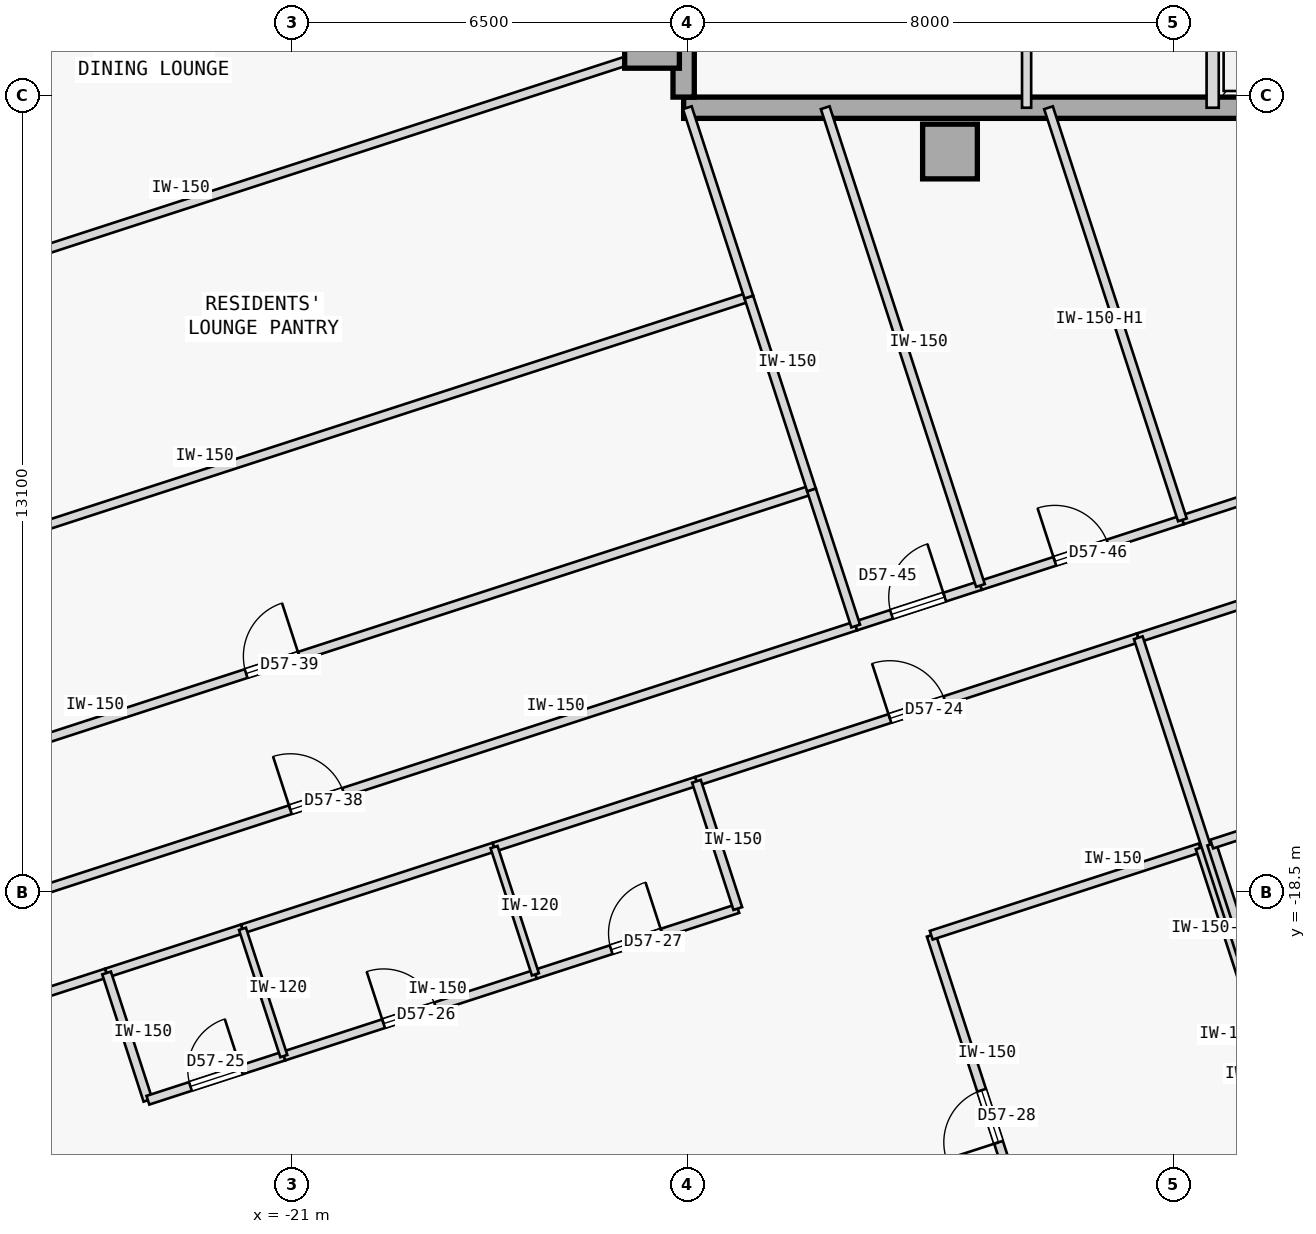
"""IFC4 building model, lengths in metres.
Left out: names, types, materials, properties, quantities, classifications, styles, units other than length and angle.
Written with IfcOpenShell. Run it as: python <this file> out.ifc"""

import sys

from ifc_helpers import new_model, si_unit, direction, frame, frame_2d, origin, origin_2d, place, context, subcontext, project, spatial, rectangle, extrude, element, fill, save


model = new_model("IFC4")
c1 = context("Model", 3, precision=1e-05, world=origin(), true_north=direction((0.0, 1.0)))
c2 = subcontext(c1, "Body", "Model", "MODEL_VIEW")
j1 = project(units=[si_unit("LENGTHUNIT", "METRE"), si_unit("PLANEANGLEUNIT", "RADIAN")], contexts=[c1])
p1 = place(None, origin())
s1 = spatial("IfcSite", under=j1, at=p1, CompositionType="ELEMENT")
p2 = place(p1, origin())
s2 = spatial("IfcBuilding", under=s1, at=p2, CompositionType="ELEMENT")
p3 = place(p2, frame((0.0, 0.0, 217.6)))
s3 = spatial("IfcBuildingStorey", under=s2, at=p3, CompositionType="ELEMENT", Elevation=217.6)
for number, where, z_axis, x_axis in (
    (1, (-15.08, -4.5, 0.0), (0.0, 0.0, 1.0), (1.0, 0.0, 0.0)),
    (2, (-10.18, -6.32, 0.0), (0.0, 0.0, 1.0), (1.0, 0.0, 0.0)),
):
    element("IfcColumn", number, at=place(p3, frame(where, z_axis=z_axis, x_axis=x_axis)), inside=s3, PredefinedType="COLUMN", context=c2, shape_type="SweptSolid", body=[
        extrude(rectangle(XDim=0.9, YDim=0.9, at=origin_2d()), origin(), (0.0, 0.0, 1.0), 3.35),
    ])
p4 = place(p3, frame((-14.56, -5.6, 0.0), z_axis=(0.0, 0.0, 1.0), x_axis=(1.0, 0.0, 0.0)))
e3 = element("IfcWall", 3, at=p4, inside=s3, PredefinedType="SHEAR", context=c2, shape_type="SweptSolid", body=[
    extrude(rectangle(XDim=10.86, YDim=0.35, at=frame_2d((5.43, 0.0))), origin(), (0.0, 0.0, 1.0), 3.125),
])
p5 = place(p3, frame((-14.56, -5.425, 0.0), z_axis=(0.0, 0.0, 1.0), x_axis=(0.0, 1.0, 0.0)))
e4 = element("IfcWall", 4, at=p5, inside=s3, PredefinedType="SHEAR", context=c2, shape_type="SweptSolid", body=[
    extrude(rectangle(XDim=10.85, YDim=0.35, at=frame_2d((5.425, 0.0))), origin(), (0.0, 0.0, 1.0), 3.125),
])
p6 = place(p3, frame((-5.86, -5.6, 0.0), z_axis=(0.0, 0.0, 1.0), x_axis=(0.0, 1.0, 0.0)))
e5 = element("IfcWall", 5, at=p6, inside=s3, PredefinedType="STANDARD", context=c2, shape_type="SweptSolid", body=[
    extrude(rectangle(XDim=2.65, YDim=0.2, at=frame_2d((1.325, 0.0))), origin(), (0.0, 0.0, 1.0), 3.125),
])
p7 = place(p3, frame((-8.92, -5.6, 0.0), z_axis=(0.0, 0.0, 1.0), x_axis=(0.0, 1.0, 0.0)))
e6 = element("IfcWall", 6, at=p7, inside=s3, PredefinedType="PARTITIONING", context=c2, shape_type="SweptSolid", body=[
    extrude(rectangle(XDim=2.65, YDim=0.15, at=frame_2d((1.325, 0.0))), origin(), (0.0, 0.0, 1.0), 3.125),
])
p8 = place(p3, frame((-28.95, -21.421, 0.0), z_axis=(0.0, 0.0, 1.0), x_axis=(0.951058442388, 0.309011066408, 0.0)))
e7 = element("IfcWall", 7, at=p8, inside=s3, PredefinedType="PARTITIONING", context=c2, shape_type="SweptSolid", body=[
    extrude(rectangle(XDim=5.152, YDim=0.15, at=frame_2d((2.576, 0.0))), origin(), (0.0, 0.0, 1.0), 3.125),
])
p9 = place(p3, frame((-14.349, -16.677, 0.0), z_axis=(0.0, 0.0, 1.0), x_axis=(0.951058958043, 0.309009479345, 0.0)))
e8 = element("IfcWall", 8, at=p9, inside=s3, PredefinedType="PARTITIONING", context=c2, shape_type="SweptSolid", body=[
    extrude(rectangle(XDim=7.64, YDim=0.15, at=frame_2d((3.82, 0.0))), origin(), (0.0, 0.0, 1.0), 3.125),
])
p10 = place(p9, frame((3.345, 0.0, 0.0)))
e9 = element("IfcOpeningElement", 9, at=p10, cuts=e8, PredefinedType="OPENING", context=c2, shape_type="SweptSolid", body=[
    extrude(rectangle(XDim=0.95, YDim=2.15, at=frame_2d((0.475, 1.075))), frame((0.0, 0.085, 0.0), z_axis=(0.0, -1.0, 0.0), x_axis=(1.0, 0.0, 0.0)), (0.0, 0.0, 1.0), 0.17),
])
p11 = place(p3, frame((-24.05, -19.829, 0.0), z_axis=(0.0, 0.0, 1.0), x_axis=(0.951035595692, 0.309081373955, 0.0)))
e10 = element("IfcWall", 10, at=p11, inside=s3, PredefinedType="PARTITIONING", context=c2, shape_type="SweptSolid", body=[
    extrude(rectangle(XDim=2.35, YDim=0.15, at=frame_2d((1.175, 0.0))), origin(), (0.0, 0.0, 1.0), 3.125),
])
p12 = place(p3, frame((-21.815, -19.103, 0.0), z_axis=(0.0, 0.0, 1.0), x_axis=(0.951057987102, 0.309012467661, 0.0)))
e11 = element("IfcWall", 11, at=p12, inside=s3, PredefinedType="PARTITIONING", context=c2, shape_type="SweptSolid", body=[
    extrude(rectangle(XDim=4.35, YDim=0.15, at=frame_2d((2.175, 0.0))), origin(), (0.0, 0.0, 1.0), 3.125),
])
p13 = place(p3, frame((-17.678, -17.759, 0.0), z_axis=(0.0, 0.0, 1.0), x_axis=(0.951055596592, 0.309019824916, 0.0)))
e12 = element("IfcWall", 12, at=p13, inside=s3, PredefinedType="PARTITIONING", context=c2, shape_type="SweptSolid", body=[
    extrude(rectangle(XDim=3.5, YDim=0.15, at=frame_2d((1.75, 0.0))), origin(), (0.0, 0.0, 1.0), 3.125),
])
p14 = place(p3, frame((-7.083, -14.316, 0.0), z_axis=(0.0, 0.0, 1.0), x_axis=(0.951054265246, 0.309023922305, 0.0)))
e13 = element("IfcWall", 13, at=p14, inside=s3, PredefinedType="PARTITIONING", context=c2, shape_type="SweptSolid", body=[
    extrude(rectangle(XDim=4.53, YDim=0.15, at=frame_2d((2.265, 0.0))), origin(), (0.0, 0.0, 1.0), 3.125),
])
p15 = place(p3, frame((-29.45, -19.881, 0.0), z_axis=(0.0, 0.0, 1.0), x_axis=(0.95105650271, 0.309017036186, 0.0)))
e14 = element("IfcWall", 14, at=p15, inside=s3, PredefinedType="PARTITIONING", context=c2, shape_type="SweptSolid", body=[
    extrude(rectangle(XDim=18.632, YDim=0.15, at=frame_2d((9.316, 0.0))), origin(), (0.0, 0.0, 1.0), 3.125),
])
p16 = place(p15, frame((8.856, 0.0, 0.0)))
e15 = element("IfcOpeningElement", 15, at=p16, cuts=e14, PredefinedType="OPENING", context=c2, shape_type="SweptSolid", body=[
    extrude(rectangle(XDim=0.92, YDim=2.15, at=frame_2d((0.46, 1.075))), frame((0.0, 0.085, 0.0), z_axis=(0.0, -1.0, 0.0), x_axis=(1.0, 0.0, 0.0)), (0.0, 0.0, 1.0), 0.17),
])
p17 = place(p3, frame((-11.73, -14.123, 0.0), z_axis=(0.0, 0.0, 1.0), x_axis=(0.951066501686, 0.308986260812, 0.0)))
e16 = element("IfcWall", 16, at=p17, inside=s3, PredefinedType="PARTITIONING", context=c2, shape_type="SweptSolid", body=[
    extrude(rectangle(XDim=2.157, YDim=0.15, at=frame_2d((1.079, 0.0))), origin(), (0.0, 0.0, 1.0), 3.125),
])
p18 = place(p17, frame((0.618, 0.0, 0.0)))
e17 = element("IfcOpeningElement", 17, at=p18, cuts=e16, PredefinedType="OPENING", context=c2, shape_type="SweptSolid", body=[
    extrude(rectangle(XDim=0.92, YDim=2.15, at=frame_2d((0.46, 1.075))), frame((0.0, 0.085, 0.0), z_axis=(0.0, -1.0, 0.0), x_axis=(1.0, 0.0, 0.0)), (0.0, 0.0, 1.0), 0.17),
])
p19 = place(p3, frame((-9.679, -13.457, 0.0), z_axis=(0.0, 0.0, 1.0), x_axis=(0.951054104561, 0.309024416831, 0.0)))
e18 = element("IfcWall", 18, at=p19, inside=s3, PredefinedType="PARTITIONING", context=c2, shape_type="SweptSolid", body=[
    extrude(rectangle(XDim=3.492, YDim=0.15, at=frame_2d((1.746, 0.0))), origin(), (0.0, 0.0, 1.0), 3.125),
])
p20 = place(p19, frame((1.286, 0.0, 0.0)))
e19 = element("IfcOpeningElement", 19, at=p20, cuts=e18, PredefinedType="OPENING", context=c2, shape_type="SweptSolid", body=[
    extrude(rectangle(XDim=0.92, YDim=2.15, at=frame_2d((0.46, 1.075))), frame((0.0, 0.085, 0.0), z_axis=(0.0, -1.0, 0.0), x_axis=(1.0, 0.0, 0.0)), (0.0, 0.0, 1.0), 0.17),
])
p21 = place(p3, frame((-6.358, -12.377, 0.0), z_axis=(0.0, 0.0, 1.0), x_axis=(0.951049473261, 0.309038669765, 0.0)))
e20 = element("IfcWall", 20, at=p21, inside=s3, PredefinedType="PARTITIONING", context=c2, shape_type="SweptSolid", body=[
    extrude(rectangle(XDim=2.795, YDim=0.15, at=frame_2d((1.397, 0.0))), origin(), (0.0, 0.0, 1.0), 3.125),
])
p22 = place(p3, frame((-23.37, -21.922, 0.0), z_axis=(0.0, 0.0, 1.0), x_axis=(-0.308960600764, 0.951074837842, 0.0)))
e21 = element("IfcWall", 21, at=p22, inside=s3, PredefinedType="PARTITIONING", context=c2, shape_type="SweptSolid", body=[
    extrude(rectangle(XDim=2.2, YDim=0.15, at=frame_2d((1.1, 0.0))), origin(), (0.0, 0.0, 1.0), 3.125),
])
p23 = place(p3, frame((-23.37, -21.922, 0.0), z_axis=(0.0, 0.0, 1.0), x_axis=(0.951045519245, 0.309050837767, 0.0)))
e22 = element("IfcWall", 22, at=p23, inside=s3, PredefinedType="PARTITIONING", context=c2, shape_type="SweptSolid", body=[
    extrude(rectangle(XDim=2.35, YDim=0.15, at=frame_2d((1.175, 0.0))), origin(), (0.0, 0.0, 1.0), 3.125),
])
p24 = place(p23, frame((0.735, 0.0, 0.0)))
e23 = element("IfcOpeningElement", 23, at=p24, cuts=e22, PredefinedType="OPENING", context=c2, shape_type="SweptSolid", body=[
    extrude(rectangle(XDim=0.88, YDim=2.15, at=frame_2d((0.44, 1.075))), frame((0.0, 0.085, 0.0), z_axis=(0.0, -1.0, 0.0), x_axis=(1.0, 0.0, 0.0)), (0.0, 0.0, 1.0), 0.17),
])
p25 = place(p3, frame((-21.135, -21.195, 0.0), z_axis=(0.0, 0.0, 1.0), x_axis=(0.951069122051, 0.308978195154, 0.0)))
e24 = element("IfcWall", 24, at=p25, inside=s3, PredefinedType="PARTITIONING", context=c2, shape_type="SweptSolid", body=[
    extrude(rectangle(XDim=4.35, YDim=0.15, at=frame_2d((2.175, 0.0))), origin(), (0.0, 0.0, 1.0), 3.125),
])
p26 = place(p25, frame((1.725, 0.0, 0.0)))
e25 = element("IfcOpeningElement", 25, at=p26, cuts=e24, PredefinedType="OPENING", context=c2, shape_type="SweptSolid", body=[
    extrude(rectangle(XDim=0.9, YDim=2.15, at=frame_2d((0.45, 1.075))), frame((0.0, 0.085, 0.0), z_axis=(0.0, -1.0, 0.0), x_axis=(1.0, 0.0, 0.0)), (0.0, 0.0, 1.0), 0.17),
])
p27 = place(p3, frame((-16.998, -19.851, 0.0), z_axis=(0.0, 0.0, 1.0), x_axis=(0.951041757107, 0.309062414796, 0.0)))
e26 = element("IfcWall", 26, at=p27, inside=s3, PredefinedType="PARTITIONING", context=c2, shape_type="SweptSolid", body=[
    extrude(rectangle(XDim=3.5, YDim=0.15, at=frame_2d((1.75, 0.0))), origin(), (0.0, 0.0, 1.0), 3.125),
])
p28 = place(p27, frame((1.31, 0.0, 0.0)))
e27 = element("IfcOpeningElement", 27, at=p28, cuts=e26, PredefinedType="OPENING", context=c2, shape_type="SweptSolid", body=[
    extrude(rectangle(XDim=0.88, YDim=2.15, at=frame_2d((0.44, 1.075))), frame((0.0, 0.085, 0.0), z_axis=(0.0, -1.0, 0.0), x_axis=(1.0, 0.0, 0.0)), (0.0, 0.0, 1.0), 0.17),
])
p29 = place(p3, frame((-13.669, -18.77, 0.0), z_axis=(0.0, 0.0, 1.0), x_axis=(-0.309060979314, 0.951042223598, 0.0)))
e28 = element("IfcWall", 28, at=p29, inside=s3, PredefinedType="PARTITIONING", context=c2, shape_type="SweptSolid", body=[
    extrude(rectangle(XDim=2.2, YDim=0.15, at=frame_2d((1.1, 0.0))), origin(), (0.0, 0.0, 1.0), 3.125),
])
p30 = place(p3, frame((-8.553, -25.164, 0.0), z_axis=(0.0, 0.0, 1.0), x_axis=(-0.309013782848, 0.951057559777, 0.0)))
e29 = element("IfcWall", 29, at=p30, inside=s3, PredefinedType="PARTITIONING", context=c2, shape_type="SweptSolid", body=[
    extrude(rectangle(XDim=6.262, YDim=0.15, at=frame_2d((3.131, 0.0))), origin(), (0.0, 0.0, 1.0), 3.125),
])
p31 = place(p30, frame((2.681, 0.0, 0.0)))
e30 = element("IfcOpeningElement", 30, at=p31, cuts=e29, PredefinedType="OPENING", context=c2, shape_type="SweptSolid", body=[
    extrude(rectangle(XDim=0.9, YDim=2.15, at=frame_2d((0.45, 1.075))), frame((0.0, 0.085, 0.0), z_axis=(0.0, -1.0, 0.0), x_axis=(1.0, 0.0, 0.0)), (0.0, 0.0, 1.0), 0.17),
])
p32 = place(p3, frame((-10.488, -19.208, 0.0), z_axis=(0.0, 0.0, 1.0), x_axis=(0.951050272606, 0.309036209813, 0.0)))
e31 = element("IfcWall", 31, at=p32, inside=s3, PredefinedType="PARTITIONING", context=c2, shape_type="SweptSolid", body=[
    extrude(rectangle(XDim=4.65, YDim=0.15, at=frame_2d((2.325, 0.0))), origin(), (0.0, 0.0, 1.0), 3.125),
])
p33 = place(p3, frame((-4.131, -23.727, 0.0), z_axis=(0.0, 0.0, 1.0), x_axis=(-0.309013782848, 0.951057559777, 0.0)))
e32 = element("IfcWall", 32, at=p33, inside=s3, PredefinedType="PARTITIONING", context=c2, shape_type="SweptSolid", body=[
    extrude(rectangle(XDim=6.262, YDim=0.15, at=frame_2d((3.131, 0.0))), origin(), (0.0, 0.0, 1.0), 2.675),
])
p34 = place(p3, frame((-4.036, -23.696, 0.0), z_axis=(0.0, 0.0, 1.0), x_axis=(-0.309022258842, 0.95105480575, 0.0)))
e33 = element("IfcWall", 33, at=p34, inside=s3, PredefinedType="PARTITIONING", context=c2, shape_type="SweptSolid", body=[
    extrude(rectangle(XDim=9.862, YDim=0.15, at=frame_2d((4.931, 0.0))), origin(), (0.0, 0.0, 1.0), 2.675),
])
p35 = place(p3, frame((-21.135, -21.195, 0.0), z_axis=(0.0, 0.0, 1.0), x_axis=(-0.309060979314, 0.951042223598, 0.0)))
e34 = element("IfcWall", 34, at=p35, inside=s3, PredefinedType="PARTITIONING", context=c2, shape_type="SweptSolid", body=[
    extrude(rectangle(XDim=2.2, YDim=0.12, at=frame_2d((1.1, 0.0))), origin(), (0.0, 0.0, 1.0), 3.125),
])
p36 = place(p3, frame((-16.998, -19.851, 0.0), z_axis=(0.0, 0.0, 1.0), x_axis=(-0.30892799396, 0.951085429679, 0.0)))
e35 = element("IfcWall", 35, at=p36, inside=s3, PredefinedType="PARTITIONING", context=c2, shape_type="SweptSolid", body=[
    extrude(rectangle(XDim=2.2, YDim=0.12, at=frame_2d((1.1, 0.0))), origin(), (0.0, 0.0, 1.0), 3.125),
])
p37 = place(p3, frame((-3.941, -23.665, 0.0), z_axis=(0.0, 0.0, 1.0), x_axis=(-0.309013782848, 0.951057559777, 0.0)))
e36 = element("IfcWall", 36, at=p37, inside=s3, PredefinedType="PARTITIONING", context=c2, shape_type="SweptSolid", body=[
    extrude(rectangle(XDim=6.262, YDim=0.15, at=frame_2d((3.131, 0.0))), origin(), (0.0, 0.0, 1.0), 2.675),
])
p38 = place(p3, frame((-5.876, -17.709, 0.0), z_axis=(0.0, 0.0, 1.0), x_axis=(0.951065702951, 0.308988719326, 0.0)))
e37 = element("IfcWall", 37, at=p38, inside=s3, PredefinedType="PARTITIONING", context=c2, shape_type="SweptSolid", body=[
    extrude(rectangle(XDim=4.65, YDim=0.15, at=frame_2d((2.325, 0.0))), origin(), (0.0, 0.0, 1.0), 3.125),
])
p39 = place(p3, frame((-30.178, -17.642, 0.0), z_axis=(0.0, 0.0, 1.0), x_axis=(0.95105650271, 0.309017036186, 0.0)))
e38 = element("IfcWall", 38, at=p39, inside=s3, PredefinedType="PARTITIONING", context=c2, shape_type="SweptSolid", body=[
    extrude(rectangle(XDim=18.632, YDim=0.15, at=frame_2d((9.316, 0.0))), origin(), (0.0, 0.0, 1.0), 3.125),
])
p40 = place(p39, frame((8.856, 0.0, 0.0)))
e39 = element("IfcOpeningElement", 39, at=p40, cuts=e38, PredefinedType="OPENING", context=c2, shape_type="SweptSolid", body=[
    extrude(rectangle(XDim=0.92, YDim=2.15, at=frame_2d((0.46, 1.075))), frame((0.0, 0.085, 0.0), z_axis=(0.0, -1.0, 0.0), x_axis=(1.0, 0.0, 0.0)), (0.0, 0.0, 1.0), 0.17),
])
p41 = place(p3, frame((-11.73, -14.123, 0.0), z_axis=(0.0, 0.0, 1.0), x_axis=(-0.309062621189, 0.951041690035, 0.0)))
e40 = element("IfcWall", 40, at=p41, inside=s3, PredefinedType="PARTITIONING", context=c2, shape_type="SweptSolid", body=[
    extrude(rectangle(XDim=2.354, YDim=0.15, at=frame_2d((1.177, 0.0))), origin(), (0.0, 0.0, 1.0), 3.125),
])
p42 = place(p3, frame((-31.208, -14.471, 0.0), z_axis=(0.0, 0.0, 1.0), x_axis=(0.951057753948, 0.309013185244, 0.0)))
e41 = element("IfcWall", 41, at=p42, inside=s3, PredefinedType="PARTITIONING", context=c2, shape_type="SweptSolid", body=[
    extrude(rectangle(XDim=18.632, YDim=0.15, at=frame_2d((9.316, 0.0))), origin(), (0.0, 0.0, 1.0), 3.125),
])
p43 = place(p3, frame((-12.458, -11.884, 0.0), z_axis=(0.0, 0.0, 1.0), x_axis=(-0.308946982245, 0.951079261766, 0.0)))
e42 = element("IfcWall", 42, at=p43, inside=s3, PredefinedType="PARTITIONING", context=c2, shape_type="SweptSolid", body=[
    extrude(rectangle(XDim=3.334, YDim=0.15, at=frame_2d((1.667, 0.0))), origin(), (0.0, 0.0, 1.0), 3.125),
])
p44 = place(p3, frame((-30.663, -9.757, 0.0), z_axis=(0.0, 0.0, 1.0), x_axis=(0.951058192995, 0.309011833974, 0.0)))
e43 = element("IfcWall", 43, at=p44, inside=s3, PredefinedType="PARTITIONING", context=c2, shape_type="SweptSolid", body=[
    extrude(rectangle(XDim=16.657, YDim=0.15, at=frame_2d((8.329, 0.0))), origin(), (0.0, 0.0, 1.0), 3.125),
])
p45 = place(p3, frame((-13.488, -8.713, 0.0), z_axis=(0.0, 0.0, 1.0), x_axis=(-0.309082700143, 0.951035164687, 0.0)))
e44 = element("IfcWall", 44, at=p45, inside=s3, PredefinedType="PARTITIONING", context=c2, shape_type="SweptSolid", body=[
    extrude(rectangle(XDim=3.274, YDim=0.15, at=frame_2d((1.637, 0.0))), origin(), (0.0, 0.0, 1.0), 3.125),
])
p46 = place(p3, frame((-32.179, -5.093, 0.0), z_axis=(0.0, 0.0, 1.0), x_axis=(0.951053885426, 0.309025091239, 0.0)))
e45 = element("IfcWall", 45, at=p46, inside=s3, PredefinedType="PARTITIONING", context=c2, shape_type="SweptSolid", body=[
    extrude(rectangle(XDim=16.657, YDim=0.15, at=frame_2d((8.329, 0.0))), origin(), (0.0, 0.0, 1.0), 3.125),
])
p47 = place(p3, frame((-9.679, -13.457, 0.0), z_axis=(0.0, 0.0, 1.0), x_axis=(-0.309010558951, 0.951058607267, 0.0)))
e46 = element("IfcWall", 46, at=p47, inside=s3, PredefinedType="PARTITIONING", context=c2, shape_type="SweptSolid", body=[
    extrude(rectangle(XDim=8.261, YDim=0.15, at=frame_2d((4.13, 0.0))), origin(), (0.0, 0.0, 1.0), 3.125),
])
p48 = place(p3, frame((-6.358, -12.377, 0.0), z_axis=(0.0, 0.0, 1.0), x_axis=(-0.309024097906, 0.951054208189, 0.0)))
e47 = element("IfcWall", 47, at=p48, inside=s3, PredefinedType="PARTITIONING", context=c2, shape_type="SweptSolid", body=[
    extrude(rectangle(XDim=7.126, YDim=0.15, at=frame_2d((3.563, 0.0))), origin(), (0.0, 0.0, 1.0), 2.675),
])
p49 = place(p10, origin())
e48 = element("IfcDoor", 48, at=p49, inside=s3, OperationType="SINGLE_SWING_LEFT", PredefinedType="DOOR", context=c2, shape_type="SweptSolid", body=[
    extrude(rectangle(XDim=0.95, YDim=2.15, at=frame_2d((0.475, 1.075))), frame((0.0, 0.025, 0.0), z_axis=(0.0, -1.0, 0.0), x_axis=(1.0, 0.0, 0.0)), (0.0, 0.0, 1.0), 0.05),
])
fill(e9, e48)
p50 = place(p24, origin())
e49 = element("IfcDoor", 49, at=p50, inside=s3, OperationType="SINGLE_SWING_RIGHT", PredefinedType="DOOR", context=c2, shape_type="SweptSolid", body=[
    extrude(rectangle(XDim=0.88, YDim=2.15, at=frame_2d((0.44, 1.075))), frame((0.0, 0.025, 0.0), z_axis=(0.0, -1.0, 0.0), x_axis=(1.0, 0.0, 0.0)), (0.0, 0.0, 1.0), 0.05),
])
fill(e23, e49)
p51 = place(p26, origin())
e50 = element("IfcDoor", 50, at=p51, inside=s3, OperationType="SINGLE_SWING_LEFT", PredefinedType="DOOR", context=c2, shape_type="SweptSolid", body=[
    extrude(rectangle(XDim=0.9, YDim=2.15, at=frame_2d((0.45, 1.075))), frame((0.0, 0.025, 0.0), z_axis=(0.0, -1.0, 0.0), x_axis=(1.0, 0.0, 0.0)), (0.0, 0.0, 1.0), 0.05),
])
fill(e25, e50)
p52 = place(p28, origin())
e51 = element("IfcDoor", 51, at=p52, inside=s3, OperationType="SINGLE_SWING_RIGHT", PredefinedType="DOOR", context=c2, shape_type="SweptSolid", body=[
    extrude(rectangle(XDim=0.88, YDim=2.15, at=frame_2d((0.44, 1.075))), frame((0.0, 0.025, 0.0), z_axis=(0.0, -1.0, 0.0), x_axis=(1.0, 0.0, 0.0)), (0.0, 0.0, 1.0), 0.05),
])
fill(e27, e51)
p53 = place(p31, origin())
e52 = element("IfcDoor", 52, at=p53, inside=s3, OperationType="SINGLE_SWING_LEFT", PredefinedType="DOOR", context=c2, shape_type="SweptSolid", body=[
    extrude(rectangle(XDim=0.9, YDim=2.15, at=frame_2d((0.45, 1.075))), frame((0.0, 0.025, 0.0), z_axis=(0.0, -1.0, 0.0), x_axis=(1.0, 0.0, 0.0)), (0.0, 0.0, 1.0), 0.05),
])
fill(e30, e52)
p54 = place(p16, origin())
e53 = element("IfcDoor", 53, at=p54, inside=s3, OperationType="SINGLE_SWING_LEFT", PredefinedType="DOOR", context=c2, shape_type="SweptSolid", body=[
    extrude(rectangle(XDim=0.92, YDim=2.15, at=frame_2d((0.46, 1.075))), frame((0.0, 0.025, 0.0), z_axis=(0.0, -1.0, 0.0), x_axis=(1.0, 0.0, 0.0)), (0.0, 0.0, 1.0), 0.05),
])
fill(e15, e53)
p55 = place(p40, origin())
e54 = element("IfcDoor", 54, at=p55, inside=s3, OperationType="SINGLE_SWING_RIGHT", PredefinedType="DOOR", context=c2, shape_type="SweptSolid", body=[
    extrude(rectangle(XDim=0.92, YDim=2.15, at=frame_2d((0.46, 1.075))), frame((0.0, 0.025, 0.0), z_axis=(0.0, -1.0, 0.0), x_axis=(1.0, 0.0, 0.0)), (0.0, 0.0, 1.0), 0.05),
])
fill(e39, e54)
p56 = place(p18, origin())
e55 = element("IfcDoor", 55, at=p56, inside=s3, OperationType="SINGLE_SWING_RIGHT", PredefinedType="DOOR", context=c2, shape_type="SweptSolid", body=[
    extrude(rectangle(XDim=0.92, YDim=2.15, at=frame_2d((0.46, 1.075))), frame((0.0, 0.025, 0.0), z_axis=(0.0, -1.0, 0.0), x_axis=(1.0, 0.0, 0.0)), (0.0, 0.0, 1.0), 0.05),
])
fill(e17, e55)
p57 = place(p20, origin())
e56 = element("IfcDoor", 56, at=p57, inside=s3, OperationType="SINGLE_SWING_LEFT", PredefinedType="DOOR", context=c2, shape_type="SweptSolid", body=[
    extrude(rectangle(XDim=0.92, YDim=2.15, at=frame_2d((0.46, 1.075))), frame((0.0, 0.025, 0.0), z_axis=(0.0, -1.0, 0.0), x_axis=(1.0, 0.0, 0.0)), (0.0, 0.0, 1.0), 0.05),
])
fill(e19, e56)
save(model, sys.argv[1])
